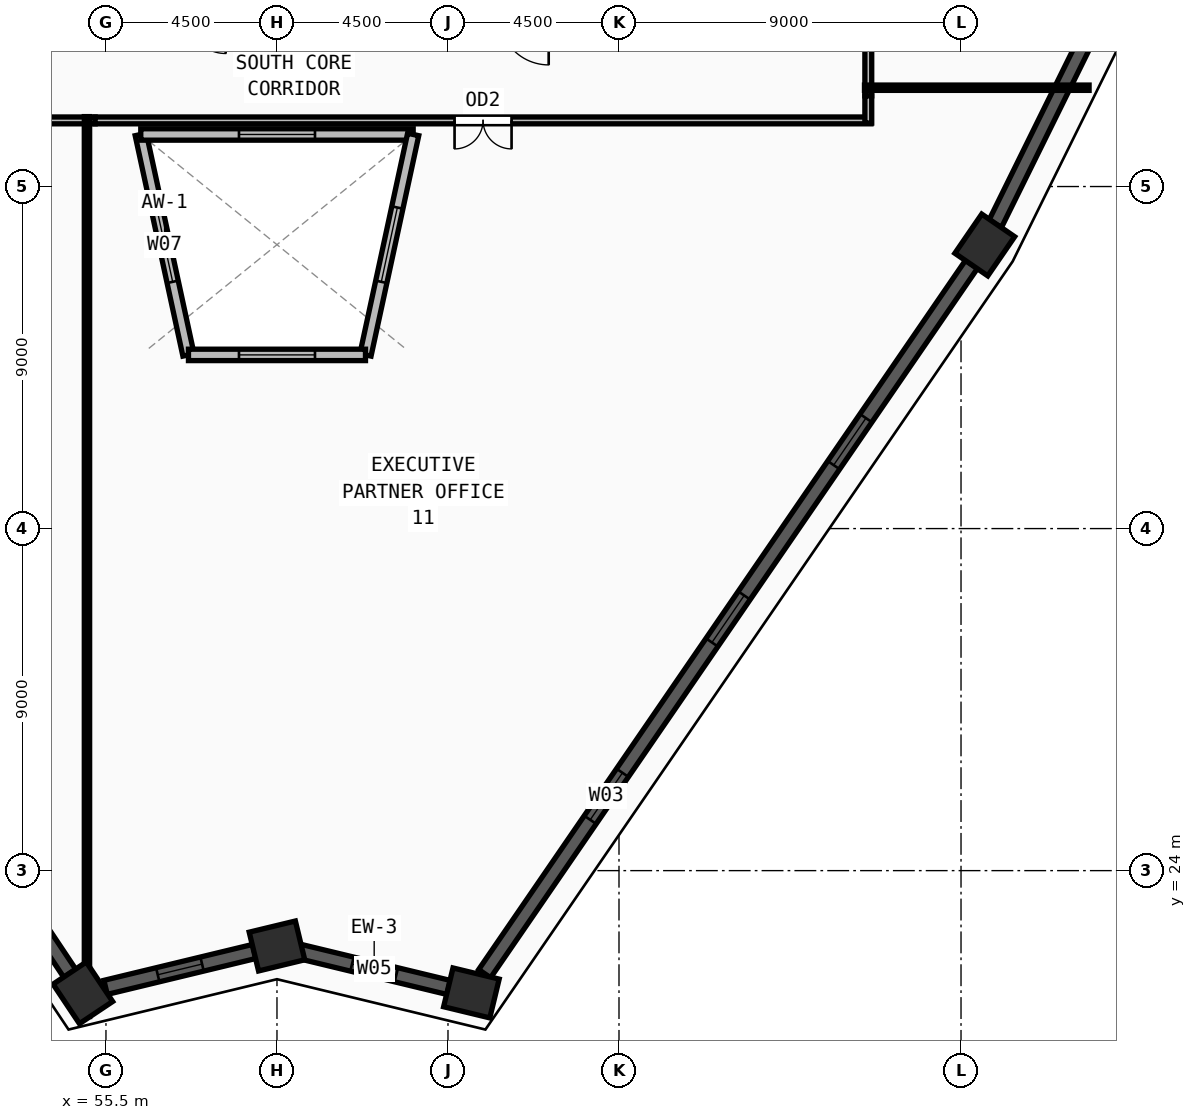
"""IFC4 building model, lengths in metres.
Left out: names, types, materials, properties, quantities, classifications, styles, units other than length and angle.
Written with IfcOpenShell. Run it as: python <this file> out.ifc"""

import sys

from ifc_helpers import new_model, si_unit, direction, frame, frame_2d, origin, origin_2d, place, context, subcontext, project, spatial, rectangle, extrude, source, transform, mapped, element, fill, save


model = new_model("IFC4")
c1 = context("Model", 3, precision=1e-05, world=origin(), true_north=direction((0.0, 1.0)))
c2 = subcontext(c1, "Body", "Model", "MODEL_VIEW")
j1 = project(units=[si_unit("LENGTHUNIT", "METRE"), si_unit("PLANEANGLEUNIT", "RADIAN")], contexts=[c1])
p1 = place(None, origin())
s1 = spatial("IfcSite", under=j1, at=p1, CompositionType="ELEMENT")
p2 = place(p1, origin())
s2 = spatial("IfcBuilding", under=s1, at=p2, CompositionType="ELEMENT")
p3 = place(p2, frame((0.0, 0.0, 270.0)))
s3 = spatial("IfcBuildingStorey", under=s2, at=p3, CompositionType="ELEMENT", Elevation=270.0)
m1 = source(origin(), c2, "Body", "SweptSolid", [
    extrude(rectangle(XDim=1.25, YDim=1.05, at=origin_2d()), origin(), (0.0, 0.0, 1.0), 3.75),
])
for number, where, z_axis, x_axis in (
    (1, (54.892, 20.784, 0.0), (0.0, 0.0, 1.0), (-0.555, 0.832, 0.0)),
    (2, (78.625, 40.462, 0.0), (0.0, 0.0, 1.0), (0.566, 0.824, 0.0)),
    (3, (65.116, 20.782, 0.0), (0.0, 0.0, 1.0), (-0.972, 0.235, 0.0)),
    (4, (60.0, 22.017, 0.0), (0.0, 0.0, 1.0), (0.972, 0.235, 0.0)),
):
    element("IfcColumn", number, at=place(p3, frame(where, z_axis=z_axis, x_axis=x_axis)), inside=s3, PredefinedType="COLUMN", context=c2, shape_type="MappedRepresentation", body=[
        mapped(m1, transform((0.0, 0.0, 0.0), x_axis=(1.0, 0.0, 0.0), y_axis=(0.0, 1.0, 0.0), z_axis=(0.0, 0.0, 1.0), scale=1.0)),
    ])
p4 = place(p3, frame((60.598, 21.873, 0.0), z_axis=(0.0, 0.0, 1.0), x_axis=(0.972038387523, -0.234822003189, 0.0)))
e5 = element("IfcWall", 5, at=p4, inside=s3, PredefinedType="SOLIDWALL", context=c2, shape_type="SweptSolid", body=[
    extrude(rectangle(XDim=4.033, YDim=0.38, at=frame_2d((2.017, 0.0))), origin(), (0.0, 0.0, 1.0), 3.57),
])
m2 = source(origin(), c2, "Body", "SweptSolid", [
    extrude(rectangle(XDim=1.2, YDim=1.9, at=frame_2d((0.6, 0.95))), frame((0.0, 0.2, 0.0), z_axis=(0.0, -1.0, 0.0), x_axis=(1.0, 0.0, 0.0)), (0.0, 0.0, 1.0), 0.4),
])
p5 = place(p4, frame((1.416, 0.0, 0.55)))
e6 = element("IfcOpeningElement", 6, at=p5, cuts=e5, PredefinedType="OPENING", context=c2, shape_type="MappedRepresentation", body=[
    mapped(m2, transform((0.0, 0.0, 0.0), x_axis=(1.0, 0.0, 0.0), y_axis=(0.0, 1.0, 0.0), z_axis=(0.0, 0.0, 1.0), scale=1.0)),
])
p6 = place(p3, frame((65.464, 21.289, 0.0), z_axis=(0.0, 0.0, 1.0), x_axis=(0.565931900147, 0.824451990352, 0.0)))
e7 = element("IfcWall", 7, at=p6, inside=s3, PredefinedType="SOLIDWALL", context=c2, shape_type="SweptSolid", body=[
    extrude(rectangle(XDim=22.641, YDim=0.38, at=frame_2d((11.32, 0.0))), origin(), (0.0, 0.0, 1.0), 3.57),
])
m3 = source(origin(), c2, "Body", "SweptSolid", [
    extrude(rectangle(XDim=1.5, YDim=1.9, at=frame_2d((0.75, 0.95))), frame((0.0, 0.2, 0.0), z_axis=(0.0, -1.0, 0.0), x_axis=(1.0, 0.0, 0.0)), (0.0, 0.0, 1.0), 0.4),
])
p7 = place(p6, frame((4.91, 0.0, 0.55)))
e8 = element("IfcOpeningElement", 8, at=p7, cuts=e7, PredefinedType="OPENING", context=c2, shape_type="MappedRepresentation", body=[
    mapped(m3, transform((0.0, 0.0, 0.0), x_axis=(1.0, 0.0, 0.0), y_axis=(0.0, 1.0, 0.0), z_axis=(0.0, 0.0, 1.0), scale=1.0)),
])
p8 = place(p6, frame((10.57, 0.0, 0.55)))
e9 = element("IfcOpeningElement", 9, at=p8, cuts=e7, PredefinedType="OPENING", context=c2, shape_type="MappedRepresentation", body=[
    mapped(m3, transform((0.0, 0.0, 0.0), x_axis=(1.0, 0.0, 0.0), y_axis=(0.0, 1.0, 0.0), z_axis=(0.0, 0.0, 1.0), scale=1.0)),
])
p9 = place(p6, frame((16.23, 0.0, 0.55)))
e10 = element("IfcOpeningElement", 10, at=p9, cuts=e7, PredefinedType="OPENING", context=c2, shape_type="MappedRepresentation", body=[
    mapped(m3, transform((0.0, 0.0, 0.0), x_axis=(1.0, 0.0, 0.0), y_axis=(0.0, 1.0, 0.0), z_axis=(0.0, 0.0, 1.0), scale=1.0)),
])
p10 = place(p3, frame((78.897, 41.013, 0.0), z_axis=(0.0, 0.0, 1.0), x_axis=(0.44256239755, 0.896737712084, 0.0)))
e11 = element("IfcWall", 11, at=p10, inside=s3, PredefinedType="SOLIDWALL", context=c2, shape_type="SweptSolid", body=[
    extrude(rectangle(XDim=27.456, YDim=0.38, at=frame_2d((13.728, 0.0))), origin(), (0.0, 0.0, 1.0), 3.57),
])
p11 = place(p10, frame((6.114, 0.0, 0.55)))
e12 = element("IfcOpeningElement", 12, at=p11, cuts=e11, PredefinedType="OPENING", context=c2, shape_type="MappedRepresentation", body=[
    mapped(m3, transform((0.0, 0.0, 0.0), x_axis=(1.0, 0.0, 0.0), y_axis=(0.0, 1.0, 0.0), z_axis=(0.0, 0.0, 1.0), scale=1.0)),
])
p12 = place(p10, frame((12.978, 0.0, 0.55)))
e13 = element("IfcOpeningElement", 13, at=p12, cuts=e11, PredefinedType="OPENING", context=c2, shape_type="MappedRepresentation", body=[
    mapped(m3, transform((0.0, 0.0, 0.0), x_axis=(1.0, 0.0, 0.0), y_axis=(0.0, 1.0, 0.0), z_axis=(0.0, 0.0, 1.0), scale=1.0)),
])
p13 = place(p10, frame((19.842, 0.0, 0.55)))
e14 = element("IfcOpeningElement", 14, at=p13, cuts=e11, PredefinedType="OPENING", context=c2, shape_type="MappedRepresentation", body=[
    mapped(m3, transform((0.0, 0.0, 0.0), x_axis=(1.0, 0.0, 0.0), y_axis=(0.0, 1.0, 0.0), z_axis=(0.0, 0.0, 1.0), scale=1.0)),
])
p14 = place(p3, frame((39.306, 44.128, 0.0), z_axis=(0.0, 0.0, 1.0), x_axis=(0.555258257402, -0.831677983108, 0.0)))
e15 = element("IfcWall", 15, at=p14, inside=s3, PredefinedType="SOLIDWALL", context=c2, shape_type="SweptSolid", body=[
    extrude(rectangle(XDim=27.454, YDim=0.38, at=frame_2d((13.727, 0.0))), origin(), (0.0, 0.0, 1.0), 3.57),
])
p15 = place(p14, frame((6.114, 0.0, 0.55)))
e16 = element("IfcOpeningElement", 16, at=p15, cuts=e15, PredefinedType="OPENING", context=c2, shape_type="MappedRepresentation", body=[
    mapped(m3, transform((0.0, 0.0, 0.0), x_axis=(1.0, 0.0, 0.0), y_axis=(0.0, 1.0, 0.0), z_axis=(0.0, 0.0, 1.0), scale=1.0)),
])
p16 = place(p14, frame((12.977, 0.0, 0.55)))
e17 = element("IfcOpeningElement", 17, at=p16, cuts=e15, PredefinedType="OPENING", context=c2, shape_type="MappedRepresentation", body=[
    mapped(m3, transform((0.0, 0.0, 0.0), x_axis=(1.0, 0.0, 0.0), y_axis=(0.0, 1.0, 0.0), z_axis=(0.0, 0.0, 1.0), scale=1.0)),
])
p17 = place(p14, frame((19.841, 0.0, 0.55)))
e18 = element("IfcOpeningElement", 18, at=p17, cuts=e15, PredefinedType="OPENING", context=c2, shape_type="MappedRepresentation", body=[
    mapped(m3, transform((0.0, 0.0, 0.0), x_axis=(1.0, 0.0, 0.0), y_axis=(0.0, 1.0, 0.0), z_axis=(0.0, 0.0, 1.0), scale=1.0)),
])
p18 = place(p3, frame((55.49, 20.928, 0.0), z_axis=(0.0, 0.0, 1.0), x_axis=(0.972038774705, 0.234820400455, 0.0)))
e19 = element("IfcWall", 19, at=p18, inside=s3, PredefinedType="SOLIDWALL", context=c2, shape_type="SweptSolid", body=[
    extrude(rectangle(XDim=4.025, YDim=0.38, at=frame_2d((2.012, 0.0))), origin(), (0.0, 0.0, 1.0), 3.57),
])
p19 = place(p18, frame((1.412, 0.0, 0.55)))
e20 = element("IfcOpeningElement", 20, at=p19, cuts=e19, PredefinedType="OPENING", context=c2, shape_type="MappedRepresentation", body=[
    mapped(m2, transform((0.0, 0.0, 0.0), x_axis=(1.0, 0.0, 0.0), y_axis=(0.0, 1.0, 0.0), z_axis=(0.0, 0.0, 1.0), scale=1.0)),
])
p20 = place(p3, frame((57.671, 37.57, 0.0), z_axis=(0.0, 0.0, 1.0), x_axis=(-0.211464510569, 0.977385676573, 0.0)))
e21 = element("IfcWall", 21, at=p20, inside=s3, PredefinedType="SOLIDWALL", context=c2, shape_type="SweptSolid", body=[
    extrude(rectangle(XDim=5.934, YDim=0.3, at=frame_2d((2.967, 0.0))), origin(), (0.0, 0.0, 1.0), 3.57),
])
m4 = source(origin(), c2, "Body", "SweptSolid", [
    extrude(rectangle(XDim=2.0, YDim=1.9, at=frame_2d((1.0, 0.95))), frame((0.0, 0.16, 0.0), z_axis=(0.0, -1.0, 0.0), x_axis=(1.0, 0.0, 0.0)), (0.0, 0.0, 1.0), 0.32),
])
p21 = place(p20, frame((1.967, 0.0, 0.55)))
e22 = element("IfcOpeningElement", 22, at=p21, cuts=e21, PredefinedType="OPENING", context=c2, shape_type="MappedRepresentation", body=[
    mapped(m4, transform((0.0, 0.0, 0.0), x_axis=(1.0, 0.0, 0.0), y_axis=(0.0, 1.0, 0.0), z_axis=(0.0, 0.0, 1.0), scale=1.0)),
])
p22 = place(p3, frame((56.416, 43.37, 0.0), z_axis=(0.0, 0.0, 1.0), x_axis=(1.0, 0.0, 0.0)))
e23 = element("IfcWall", 23, at=p22, inside=s3, PredefinedType="SOLIDWALL", context=c2, shape_type="SweptSolid", body=[
    extrude(rectangle(XDim=7.168, YDim=0.3, at=frame_2d((3.584, 0.0))), origin(), (0.0, 0.0, 1.0), 3.57),
])
p23 = place(p22, frame((2.584, 0.0, 0.55)))
e24 = element("IfcOpeningElement", 24, at=p23, cuts=e23, PredefinedType="OPENING", context=c2, shape_type="MappedRepresentation", body=[
    mapped(m4, transform((0.0, 0.0, 0.0), x_axis=(1.0, 0.0, 0.0), y_axis=(0.0, 1.0, 0.0), z_axis=(0.0, 0.0, 1.0), scale=1.0)),
])
p24 = place(p3, frame((63.584, 43.37, 0.0), z_axis=(0.0, 0.0, 1.0), x_axis=(-0.211464510569, -0.977385676573, 0.0)))
e25 = element("IfcWall", 25, at=p24, inside=s3, PredefinedType="SOLIDWALL", context=c2, shape_type="SweptSolid", body=[
    extrude(rectangle(XDim=5.934, YDim=0.3, at=frame_2d((2.967, 0.0))), origin(), (0.0, 0.0, 1.0), 3.57),
])
p25 = place(p24, frame((1.967, 0.0, 0.55)))
e26 = element("IfcOpeningElement", 26, at=p25, cuts=e25, PredefinedType="OPENING", context=c2, shape_type="MappedRepresentation", body=[
    mapped(m4, transform((0.0, 0.0, 0.0), x_axis=(1.0, 0.0, 0.0), y_axis=(0.0, 1.0, 0.0), z_axis=(0.0, 0.0, 1.0), scale=1.0)),
])
p26 = place(p3, frame((62.329, 37.57, 0.0), z_axis=(0.0, 0.0, 1.0), x_axis=(-1.0, 0.0, 0.0)))
e27 = element("IfcWall", 27, at=p26, inside=s3, PredefinedType="SOLIDWALL", context=c2, shape_type="SweptSolid", body=[
    extrude(rectangle(XDim=4.658, YDim=0.3, at=frame_2d((2.329, 0.0))), origin(), (0.0, 0.0, 1.0), 3.57),
])
p27 = place(p26, frame((1.329, 0.0, 0.55)))
e28 = element("IfcOpeningElement", 28, at=p27, cuts=e27, PredefinedType="OPENING", context=c2, shape_type="MappedRepresentation", body=[
    mapped(m4, transform((0.0, 0.0, 0.0), x_axis=(1.0, 0.0, 0.0), y_axis=(0.0, 1.0, 0.0), z_axis=(0.0, 0.0, 1.0), scale=1.0)),
])
p28 = place(p3, frame((55.215, 43.74, 0.0), z_axis=(0.0, 0.0, 1.0), x_axis=(-1.0, 0.0, 0.0)))
e29 = element("IfcWall", 29, at=p28, inside=s3, PredefinedType="PARTITIONING", context=c2, shape_type="SweptSolid", body=[
    extrude(rectangle(XDim=10.845, YDim=0.18, at=frame_2d((5.422, 0.0))), origin(), (0.0, 0.0, 1.0), 3.57),
])
m5 = source(origin(), c2, "Body", "SweptSolid", [
    extrude(rectangle(XDim=1.5, YDim=2.2, at=frame_2d((0.75, 1.1))), frame((0.0, 0.1, 0.0), z_axis=(0.0, -1.0, 0.0), x_axis=(1.0, 0.0, 0.0)), (0.0, 0.0, 1.0), 0.2),
])
p29 = place(p28, frame((4.673, 0.0, 0.0)))
e30 = element("IfcOpeningElement", 30, at=p29, cuts=e29, PredefinedType="OPENING", context=c2, shape_type="MappedRepresentation", body=[
    mapped(m5, transform((0.0, 0.0, 0.0), x_axis=(1.0, 0.0, 0.0), y_axis=(0.0, 1.0, 0.0), z_axis=(0.0, 0.0, 1.0), scale=1.0)),
])
p30 = place(p3, frame((75.63, 43.74, 0.0), z_axis=(0.0, 0.0, 1.0), x_axis=(-1.0, 0.0, 0.0)))
e31 = element("IfcWall", 31, at=p30, inside=s3, PredefinedType="PARTITIONING", context=c2, shape_type="SweptSolid", body=[
    extrude(rectangle(XDim=20.415, YDim=0.18, at=frame_2d((10.208, 0.0))), origin(), (0.0, 0.0, 1.0), 3.57),
])
p31 = place(p30, frame((9.457, 0.0, 0.0)))
e32 = element("IfcOpeningElement", 32, at=p31, cuts=e31, PredefinedType="OPENING", context=c2, shape_type="MappedRepresentation", body=[
    mapped(m5, transform((0.0, 0.0, 0.0), x_axis=(1.0, 0.0, 0.0), y_axis=(0.0, 1.0, 0.0), z_axis=(0.0, 0.0, 1.0), scale=1.0)),
])
p32 = place(p3, frame((75.56, 49.785, 0.0), z_axis=(0.0, 0.0, 1.0), x_axis=(0.0, -1.0, 0.0)))
e33 = element("IfcWall", 33, at=p32, inside=s3, PredefinedType="PARTITIONING", context=c2, shape_type="SweptSolid", body=[
    extrude(rectangle(XDim=5.4, YDim=0.18, at=frame_2d((2.7, 0.0))), origin(), (0.0, 0.0, 1.0), 3.57),
])
m6 = source(origin(), c2, "Body", "SweptSolid", [
    extrude(rectangle(XDim=1.0, YDim=2.2, at=frame_2d((0.5, 1.1))), frame((0.0, 0.1, 0.0), z_axis=(0.0, -1.0, 0.0), x_axis=(1.0, 0.0, 0.0)), (0.0, 0.0, 1.0), 0.2),
])
p33 = place(p32, frame((2.2, 0.0, 0.0)))
e34 = element("IfcOpeningElement", 34, at=p33, cuts=e33, PredefinedType="OPENING", context=c2, shape_type="MappedRepresentation", body=[
    mapped(m6, transform((0.0, 0.0, 0.0), x_axis=(1.0, 0.0, 0.0), y_axis=(0.0, 1.0, 0.0), z_axis=(0.0, 0.0, 1.0), scale=1.0)),
])
p34 = place(p3, frame((75.56, 44.385, 0.0), z_axis=(0.0, 0.0, 1.0), x_axis=(0.0, -1.0, 0.0)))
e35 = element("IfcWall", 35, at=p34, inside=s3, PredefinedType="PARTITIONING", context=c2, shape_type="SweptSolid", body=[
    extrude(rectangle(XDim=0.715, YDim=0.18, at=frame_2d((0.357, 0.0))), origin(), (0.0, 0.0, 1.0), 3.57),
])
p35 = place(p3, frame((75.46, 44.6, 0.0), z_axis=(0.0, 0.0, 1.0), x_axis=(1.0, 0.0, 0.0)))
e36 = element("IfcWall", 36, at=p35, inside=s3, PredefinedType="PARTITIONING", context=c2, shape_type="SweptSolid", body=[
    extrude(rectangle(XDim=5.91, YDim=0.14, at=frame_2d((2.955, 0.0))), origin(), (0.0, 0.0, 1.0), 3.57),
])
p36 = place(p3, frame((55.0, 43.84, 0.0), z_axis=(0.0, 0.0, 1.0), x_axis=(0.0, -1.0, 0.0)))
e37 = element("IfcWall", 37, at=p36, inside=s3, PredefinedType="PARTITIONING", context=c2, shape_type="SweptSolid", body=[
    extrude(rectangle(XDim=23.679, YDim=0.14, at=frame_2d((11.84, 0.0))), origin(), (0.0, 0.0, 1.0), 2.855),
])
m7 = source(origin(), c2, "Body", "SweptSolid", [
    extrude(rectangle(XDim=1.2, YDim=1.9, at=frame_2d((0.6, 0.95))), frame((0.0, 0.03, 0.0), z_axis=(0.0, -1.0, 0.0), x_axis=(1.0, 0.0, 0.0)), (0.0, 0.0, 1.0), 0.06),
])
p37 = place(p5, origin())
e38 = element("IfcWindow", 38, at=p37, inside=s3, PartitioningType="SINGLE_PANEL", PredefinedType="WINDOW", context=c2, shape_type="MappedRepresentation", body=[
    mapped(m7, transform((0.0, 0.0, 0.0), x_axis=(1.0, 0.0, 0.0), y_axis=(0.0, 1.0, 0.0), z_axis=(0.0, 0.0, 1.0), scale=1.0)),
])
fill(e6, e38)
m8 = source(origin(), c2, "Body", "SweptSolid", [
    extrude(rectangle(XDim=1.5, YDim=1.9, at=frame_2d((0.75, 0.95))), frame((0.0, 0.03, 0.0), z_axis=(0.0, -1.0, 0.0), x_axis=(1.0, 0.0, 0.0)), (0.0, 0.0, 1.0), 0.06),
])
p38 = place(p7, origin())
e39 = element("IfcWindow", 39, at=p38, inside=s3, PartitioningType="DOUBLE_PANEL_VERTICAL", PredefinedType="WINDOW", context=c2, shape_type="MappedRepresentation", body=[
    mapped(m8, transform((0.0, 0.0, 0.0), x_axis=(1.0, 0.0, 0.0), y_axis=(0.0, 1.0, 0.0), z_axis=(0.0, 0.0, 1.0), scale=1.0)),
])
fill(e8, e39)
p39 = place(p8, origin())
e40 = element("IfcWindow", 40, at=p39, inside=s3, PartitioningType="DOUBLE_PANEL_VERTICAL", PredefinedType="WINDOW", context=c2, shape_type="MappedRepresentation", body=[
    mapped(m8, transform((0.0, 0.0, 0.0), x_axis=(1.0, 0.0, 0.0), y_axis=(0.0, 1.0, 0.0), z_axis=(0.0, 0.0, 1.0), scale=1.0)),
])
fill(e9, e40)
p40 = place(p9, origin())
e41 = element("IfcWindow", 41, at=p40, inside=s3, PartitioningType="DOUBLE_PANEL_VERTICAL", PredefinedType="WINDOW", context=c2, shape_type="MappedRepresentation", body=[
    mapped(m8, transform((0.0, 0.0, 0.0), x_axis=(1.0, 0.0, 0.0), y_axis=(0.0, 1.0, 0.0), z_axis=(0.0, 0.0, 1.0), scale=1.0)),
])
fill(e10, e41)
p41 = place(p19, origin())
e42 = element("IfcWindow", 42, at=p41, inside=s3, PartitioningType="SINGLE_PANEL", PredefinedType="WINDOW", context=c2, shape_type="MappedRepresentation", body=[
    mapped(m7, transform((0.0, 0.0, 0.0), x_axis=(1.0, 0.0, 0.0), y_axis=(0.0, 1.0, 0.0), z_axis=(0.0, 0.0, 1.0), scale=1.0)),
])
fill(e20, e42)
m9 = source(origin(), c2, "Body", "SweptSolid", [
    extrude(rectangle(XDim=2.0, YDim=1.9, at=frame_2d((1.0, 0.95))), frame((0.0, 0.03, 0.0), z_axis=(0.0, -1.0, 0.0), x_axis=(1.0, 0.0, 0.0)), (0.0, 0.0, 1.0), 0.06),
])
p42 = place(p21, origin())
e43 = element("IfcWindow", 43, at=p42, inside=s3, PartitioningType="DOUBLE_PANEL_VERTICAL", PredefinedType="WINDOW", context=c2, shape_type="MappedRepresentation", body=[
    mapped(m9, transform((0.0, 0.0, 0.0), x_axis=(1.0, 0.0, 0.0), y_axis=(0.0, 1.0, 0.0), z_axis=(0.0, 0.0, 1.0), scale=1.0)),
])
fill(e22, e43)
p43 = place(p23, origin())
e44 = element("IfcWindow", 44, at=p43, inside=s3, PartitioningType="DOUBLE_PANEL_VERTICAL", PredefinedType="WINDOW", context=c2, shape_type="MappedRepresentation", body=[
    mapped(m9, transform((0.0, 0.0, 0.0), x_axis=(1.0, 0.0, 0.0), y_axis=(0.0, 1.0, 0.0), z_axis=(0.0, 0.0, 1.0), scale=1.0)),
])
fill(e24, e44)
p44 = place(p25, origin())
e45 = element("IfcWindow", 45, at=p44, inside=s3, PartitioningType="DOUBLE_PANEL_VERTICAL", PredefinedType="WINDOW", context=c2, shape_type="MappedRepresentation", body=[
    mapped(m9, transform((0.0, 0.0, 0.0), x_axis=(1.0, 0.0, 0.0), y_axis=(0.0, 1.0, 0.0), z_axis=(0.0, 0.0, 1.0), scale=1.0)),
])
fill(e26, e45)
p45 = place(p27, origin())
e46 = element("IfcWindow", 46, at=p45, inside=s3, PartitioningType="DOUBLE_PANEL_VERTICAL", PredefinedType="WINDOW", context=c2, shape_type="MappedRepresentation", body=[
    mapped(m9, transform((0.0, 0.0, 0.0), x_axis=(1.0, 0.0, 0.0), y_axis=(0.0, 1.0, 0.0), z_axis=(0.0, 0.0, 1.0), scale=1.0)),
])
fill(e28, e46)
m10 = source(origin(), c2, "Body", "SweptSolid", [
    extrude(rectangle(XDim=1.5, YDim=2.2, at=frame_2d((0.75, 1.1))), frame((0.0, 0.025, 0.0), z_axis=(0.0, -1.0, 0.0), x_axis=(1.0, 0.0, 0.0)), (0.0, 0.0, 1.0), 0.05),
])
p46 = place(p31, origin())
e47 = element("IfcDoor", 47, at=p46, inside=s3, OperationType="DOUBLE_DOOR_SINGLE_SWING", PredefinedType="DOOR", context=c2, shape_type="MappedRepresentation", body=[
    mapped(m10, transform((0.0, 0.0, 0.0), x_axis=(1.0, 0.0, 0.0), y_axis=(0.0, 1.0, 0.0), z_axis=(0.0, 0.0, 1.0), scale=1.0)),
])
fill(e32, e47)
save(model, sys.argv[1])
